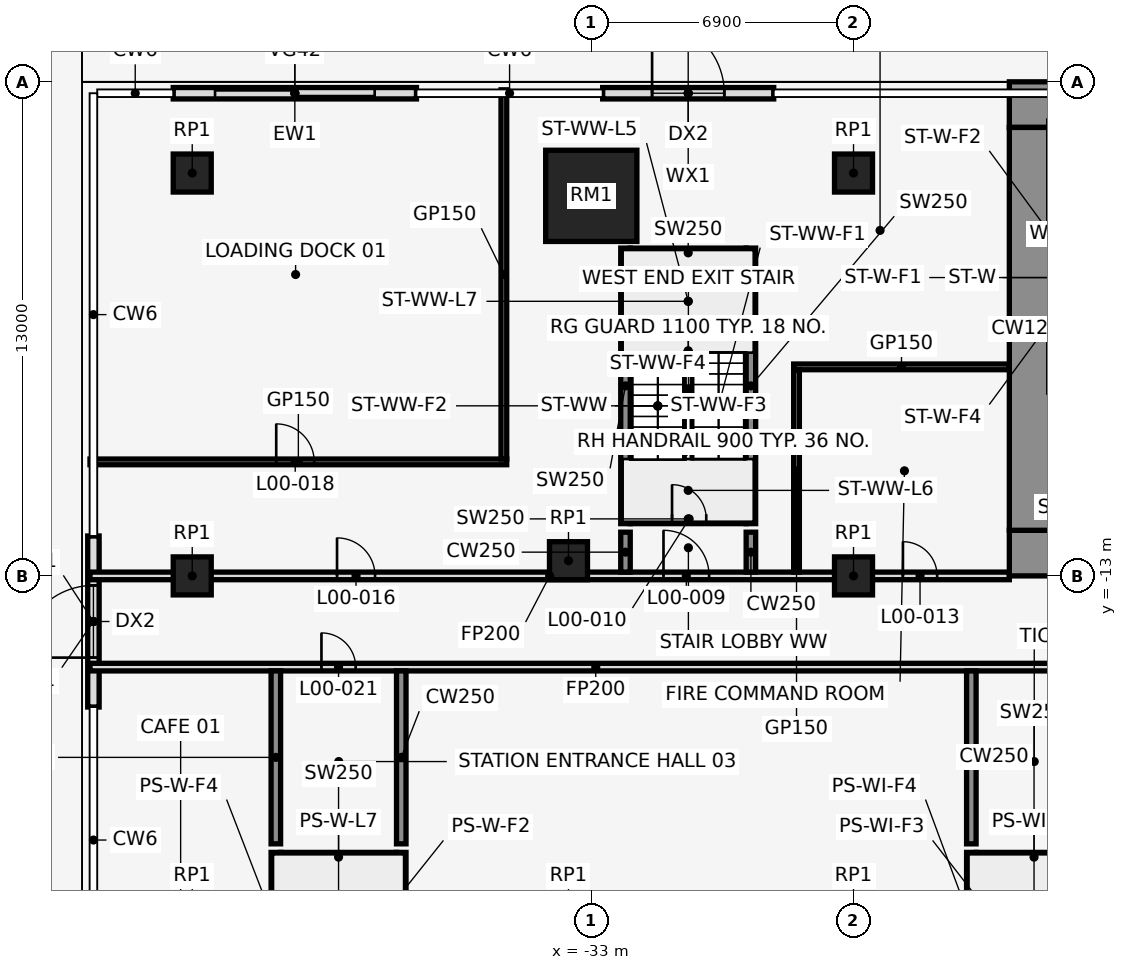
"""IFC4 building model, lengths in metres.
Left out: names, types, materials, properties, quantities, classifications, styles, units other than length and angle.
Written with IfcOpenShell. Run it as: python <this file> out.ifc"""

import sys

from ifc_helpers import new_model, si_unit, direction, frame, frame_2d, origin, origin_2d, place, context, subcontext, project, spatial, rectangle, extrude, element, fill, save


model = new_model("IFC4")
c1 = context("Model", 3, precision=1e-05, world=origin(), true_north=direction((0.0, 1.0)))
c2 = subcontext(c1, "Body", "Model", "MODEL_VIEW")
j1 = project(units=[si_unit("LENGTHUNIT", "METRE"), si_unit("PLANEANGLEUNIT", "RADIAN")], contexts=[c1])
p1 = place(None, origin())
s1 = spatial("IfcSite", under=j1, at=p1, CompositionType="ELEMENT")
p2 = place(p1, origin())
s2 = spatial("IfcBuilding", under=s1, at=p2, CompositionType="ELEMENT")
p3 = place(p2, origin())
s3 = spatial("IfcBuildingStorey", under=s2, at=p3, CompositionType="ELEMENT", Elevation=0.0)
p4 = place(p3, frame((-33.0, -3.0, 0.0), z_axis=(0.0, 0.0, 1.0), x_axis=(1.0, 0.0, 0.0)))
e1 = element("IfcColumn", 1, at=p4, inside=s3, PredefinedType="COLUMN", context=c2, shape_type="SweptSolid", body=[
    extrude(rectangle(XDim=2.4, YDim=2.4, at=origin_2d()), origin(), (0.0, 0.0, 1.0), 8.0),
])
for number, where, z_axis, x_axis in (
    (2, (-26.1, -2.4, 0.0), (0.0, 0.0, 1.0), (1.0, 0.0, 0.0)),
    (3, (-33.6, -12.6, 0.0), (0.0, 0.0, 1.0), (1.0, 0.0, 0.0)),
    (4, (-43.5, -2.4, 0.0), (0.0, 0.0, 1.0), (1.0, 0.0, 0.0)),
    (5, (-43.5, -13.0, 0.0), (0.0, 0.0, 1.0), (1.0, 0.0, 0.0)),
    (6, (-26.1, -13.0, 0.0), (0.0, 0.0, 1.0), (1.0, 0.0, 0.0)),
):
    element("IfcColumn", number, at=place(p3, frame(where, z_axis=z_axis, x_axis=x_axis)), inside=s3, PredefinedType="COLUMN", context=c2, shape_type="SweptSolid", body=[
        extrude(rectangle(XDim=1.0, YDim=1.0, at=origin_2d()), origin(), (0.0, 0.0, 1.0), 8.0),
    ])
p5 = place(p3, frame((-32.7, -0.3, 0.0), z_axis=(0.0, 0.0, 1.0), x_axis=(1.0, 0.0, 0.0)))
e7 = element("IfcWall", 7, at=p5, inside=s3, PredefinedType="STANDARD", context=c2, shape_type="SweptSolid", body=[
    extrude(rectangle(XDim=4.5, YDim=0.3, at=frame_2d((2.25, 0.0))), origin(), (0.0, 0.0, 1.0), 7.7),
])
p6 = place(p5, frame((1.3, 0.0, 0.0)))
e8 = element("IfcOpeningElement", 8, at=p6, cuts=e7, PredefinedType="OPENING", context=c2, shape_type="SweptSolid", body=[
    extrude(rectangle(XDim=1.9, YDim=2.6, at=frame_2d((0.95, 1.3))), frame((0.0, 0.162, 0.0), z_axis=(0.0, -1.0, 0.0), x_axis=(1.0, 0.0, 0.0)), (0.0, 0.0, 1.0), 0.324),
])
p7 = place(p5, frame((1.3, 0.0, 3.3)))
e9 = element("IfcOpeningElement", 9, at=p7, cuts=e7, PredefinedType="OPENING", context=c2, shape_type="SweptSolid", body=[
    extrude(rectangle(XDim=1.9, YDim=3.0, at=frame_2d((0.95, 1.5))), frame((0.0, 0.162, 0.0), z_axis=(0.0, -1.0, 0.0), x_axis=(1.0, 0.0, 0.0)), (0.0, 0.0, 1.0), 0.324),
])
p8 = place(p3, frame((-44.0, -0.3, 0.0), z_axis=(0.0, 0.0, 1.0), x_axis=(1.0, 0.0, 0.0)))
e10 = element("IfcWall", 10, at=p8, inside=s3, PredefinedType="STANDARD", context=c2, shape_type="SweptSolid", body=[
    extrude(rectangle(XDim=6.4, YDim=0.3, at=frame_2d((3.2, 0.0))), origin(), (0.0, 0.0, 1.0), 7.7),
])
p9 = place(p8, frame((1.1, 0.0, 0.0)))
e11 = element("IfcOpeningElement", 11, at=p9, cuts=e10, PredefinedType="OPENING", context=c2, shape_type="SweptSolid", body=[
    extrude(rectangle(XDim=4.2, YDim=4.5, at=frame_2d((2.1, 2.25))), frame((0.0, 0.162, 0.0), z_axis=(0.0, -1.0, 0.0), x_axis=(1.0, 0.0, 0.0)), (0.0, 0.0, 1.0), 0.324),
])
p10 = place(p3, frame((-46.1, -16.45, 0.0), z_axis=(0.0, 0.0, 1.0), x_axis=(0.0, 1.0, 0.0)))
e12 = element("IfcWall", 12, at=p10, inside=s3, PredefinedType="STANDARD", context=c2, shape_type="SweptSolid", body=[
    extrude(rectangle(XDim=4.5, YDim=0.3, at=frame_2d((2.25, 0.0))), origin(), (0.0, 0.0, 1.0), 7.7),
])
p11 = place(p10, frame((1.3, 0.0, 0.0)))
e13 = element("IfcOpeningElement", 13, at=p11, cuts=e12, PredefinedType="OPENING", context=c2, shape_type="SweptSolid", body=[
    extrude(rectangle(XDim=1.9, YDim=2.6, at=frame_2d((0.95, 1.3))), frame((0.0, 0.162, 0.0), z_axis=(0.0, -1.0, 0.0), x_axis=(1.0, 0.0, 0.0)), (0.0, 0.0, 1.0), 0.324),
])
p12 = place(p10, frame((1.3, 0.0, 3.3)))
e14 = element("IfcOpeningElement", 14, at=p12, cuts=e12, PredefinedType="OPENING", context=c2, shape_type="SweptSolid", body=[
    extrude(rectangle(XDim=1.9, YDim=3.0, at=frame_2d((0.95, 1.5))), frame((0.0, 0.162, 0.0), z_axis=(0.0, -1.0, 0.0), x_axis=(1.0, 0.0, 0.0)), (0.0, 0.0, 1.0), 0.324),
])
for number, where, z_axis, x_axis in (
    (15, (-32.1, -11.625, 0.0), (0.0, 0.0, 1.0), (0.0, 1.0, 0.0)),
    (16, (-28.8, -11.625, 0.0), (0.0, 0.0, 1.0), (0.0, 1.0, 0.0)),
):
    element("IfcWall", number, at=place(p3, frame(where, z_axis=z_axis, x_axis=x_axis)), inside=s3, PredefinedType="SHEAR", context=c2, shape_type="SweptSolid", body=[
        extrude(rectangle(XDim=7.25, YDim=0.25, at=frame_2d((3.625, 0.0))), origin(), (0.0, 0.0, 1.0), 8.0),
    ])
p13 = place(p3, frame((-31.975, -11.5, 0.0), z_axis=(0.0, 0.0, 1.0), x_axis=(1.0, 0.0, 0.0)))
e17 = element("IfcWall", 17, at=p13, inside=s3, PredefinedType="SHEAR", context=c2, shape_type="SweptSolid", body=[
    extrude(rectangle(XDim=3.05, YDim=0.25, at=frame_2d((1.525, 0.0))), origin(), (0.0, 0.0, 1.0), 8.0),
])
p14 = place(p13, frame((1.1, 0.0, 0.0)))
e18 = element("IfcOpeningElement", 18, at=p14, cuts=e17, PredefinedType="OPENING", context=c2, shape_type="SweptSolid", body=[
    extrude(rectangle(XDim=0.9, YDim=2.1, at=frame_2d((0.45, 1.05))), frame((0.0, 0.137, 0.0), z_axis=(0.0, -1.0, 0.0), x_axis=(1.0, 0.0, 0.0)), (0.0, 0.0, 1.0), 0.274),
])
p15 = place(p3, frame((-31.975, -4.5, 0.0), z_axis=(0.0, 0.0, 1.0), x_axis=(1.0, 0.0, 0.0)))
e19 = element("IfcWall", 19, at=p15, inside=s3, PredefinedType="SHEAR", context=c2, shape_type="SweptSolid", body=[
    extrude(rectangle(XDim=3.05, YDim=0.25, at=frame_2d((1.525, 0.0))), origin(), (0.0, 0.0, 1.0), 8.0),
])
for number, where, z_axis, x_axis in (
    (20, (-41.3, -27.525, 0.0), (0.0, 0.0, 1.0), (0.0, 1.0, 0.0)),
    (21, (-38.0, -27.525, 0.0), (0.0, 0.0, 1.0), (0.0, 1.0, 0.0)),
):
    element("IfcWall", number, at=place(p3, frame(where, z_axis=z_axis, x_axis=x_axis)), inside=s3, PredefinedType="SHEAR", context=c2, shape_type="SweptSolid", body=[
        extrude(rectangle(XDim=7.25, YDim=0.25, at=frame_2d((3.625, 0.0))), origin(), (0.0, 0.0, 1.0), 8.0),
    ])
p16 = place(p3, frame((-41.175, -20.4, 0.0), z_axis=(0.0, 0.0, 1.0), x_axis=(1.0, 0.0, 0.0)))
e22 = element("IfcWall", 22, at=p16, inside=s3, PredefinedType="SHEAR", context=c2, shape_type="SweptSolid", body=[
    extrude(rectangle(XDim=3.05, YDim=0.25, at=frame_2d((1.525, 0.0))), origin(), (0.0, 0.0, 1.0), 8.0),
])
p17 = place(p3, frame((-23.0, -27.525, 0.0), z_axis=(0.0, 0.0, 1.0), x_axis=(0.0, 1.0, 0.0)))
e23 = element("IfcWall", 23, at=p17, inside=s3, PredefinedType="SHEAR", context=c2, shape_type="SweptSolid", body=[
    extrude(rectangle(XDim=7.25, YDim=0.25, at=frame_2d((3.625, 0.0))), origin(), (0.0, 0.0, 1.0), 8.0),
])
p18 = place(p3, frame((-22.875, -20.4, 0.0), z_axis=(0.0, 0.0, 1.0), x_axis=(1.0, 0.0, 0.0)))
e24 = element("IfcWall", 24, at=p18, inside=s3, PredefinedType="SHEAR", context=c2, shape_type="SweptSolid", body=[
    extrude(rectangle(XDim=3.05, YDim=0.25, at=frame_2d((1.525, 0.0))), origin(), (0.0, 0.0, 1.0), 8.0),
])
p19 = place(p3, frame((-46.19, -15.4, 0.0), z_axis=(0.0, 0.0, 1.0), x_axis=(1.0, 0.0, 0.0)))
e25 = element("IfcWall", 25, at=p19, inside=s3, PredefinedType="PARTITIONING", context=c2, shape_type="SweptSolid", body=[
    extrude(rectangle(XDim=26.615, YDim=0.2, at=frame_2d((13.308, 0.0))), origin(), (0.0, 0.0, 1.0), 7.7),
])
p20 = place(p19, frame((6.09, 0.0, 0.0)))
e26 = element("IfcOpeningElement", 26, at=p20, cuts=e25, PredefinedType="OPENING", context=c2, shape_type="SweptSolid", body=[
    extrude(rectangle(XDim=0.9, YDim=2.1, at=frame_2d((0.45, 1.05))), frame((0.0, 0.112, 0.0), z_axis=(0.0, -1.0, 0.0), x_axis=(1.0, 0.0, 0.0)), (0.0, 0.0, 1.0), 0.224),
])
p21 = place(p3, frame((-46.19, -13.0, 0.0), z_axis=(0.0, 0.0, 1.0), x_axis=(1.0, 0.0, 0.0)))
e27 = element("IfcWall", 27, at=p21, inside=s3, PredefinedType="PARTITIONING", context=c2, shape_type="SweptSolid", body=[
    extrude(rectangle(XDim=24.19, YDim=0.2, at=frame_2d((12.095, 0.0))), origin(), (0.0, 0.0, 1.0), 7.7),
])
p22 = place(p21, frame((15.09, 0.0, 0.0)))
e28 = element("IfcOpeningElement", 28, at=p22, cuts=e27, PredefinedType="OPENING", context=c2, shape_type="SweptSolid", body=[
    extrude(rectangle(XDim=1.2, YDim=2.1, at=frame_2d((0.6, 1.05))), frame((0.0, 0.112, 0.0), z_axis=(0.0, -1.0, 0.0), x_axis=(1.0, 0.0, 0.0)), (0.0, 0.0, 1.0), 0.224),
])
p23 = place(p21, frame((21.39, 0.0, 0.0)))
e29 = element("IfcOpeningElement", 29, at=p23, cuts=e27, PredefinedType="OPENING", context=c2, shape_type="SweptSolid", body=[
    extrude(rectangle(XDim=0.9, YDim=2.1, at=frame_2d((0.45, 1.05))), frame((0.0, 0.112, 0.0), z_axis=(0.0, -1.0, 0.0), x_axis=(1.0, 0.0, 0.0)), (0.0, 0.0, 1.0), 0.224),
])
p24 = place(p21, frame((6.5, 0.0, 0.0)))
e30 = element("IfcOpeningElement", 30, at=p24, cuts=e27, PredefinedType="OPENING", context=c2, shape_type="SweptSolid", body=[
    extrude(rectangle(XDim=1.0, YDim=2.1, at=frame_2d((0.5, 1.05))), frame((0.0, 0.112, 0.0), z_axis=(0.0, -1.0, 0.0), x_axis=(1.0, 0.0, 0.0)), (0.0, 0.0, 1.0), 0.224),
])
p25 = place(p3, frame((-46.19, -10.0, 0.0), z_axis=(0.0, 0.0, 1.0), x_axis=(1.0, 0.0, 0.0)))
e31 = element("IfcWall", 31, at=p25, inside=s3, PredefinedType="PARTITIONING", context=c2, shape_type="SweptSolid", body=[
    extrude(rectangle(XDim=10.965, YDim=0.15, at=frame_2d((5.482, 0.0))), origin(), (0.0, 0.0, 1.0), 7.7),
])
p26 = place(p25, frame((4.9, 0.0, 0.0)))
e32 = element("IfcOpeningElement", 32, at=p26, cuts=e31, PredefinedType="OPENING", context=c2, shape_type="SweptSolid", body=[
    extrude(rectangle(XDim=1.0, YDim=2.1, at=frame_2d((0.5, 1.05))), frame((0.0, 0.087, 0.0), z_axis=(0.0, -1.0, 0.0), x_axis=(1.0, 0.0, 0.0)), (0.0, 0.0, 1.0), 0.174),
])
p27 = place(p3, frame((-27.675, -7.5, 0.0), z_axis=(0.0, 0.0, 1.0), x_axis=(1.0, 0.0, 0.0)))
e33 = element("IfcWall", 33, at=p27, inside=s3, PredefinedType="PARTITIONING", context=c2, shape_type="SweptSolid", body=[
    extrude(rectangle(XDim=5.675, YDim=0.15, at=frame_2d((2.837, 0.0))), origin(), (0.0, 0.0, 1.0), 7.7),
])
for number, where, z_axis, x_axis in (
    (34, (-41.3, -20.05, 0.0), (0.0, 0.0, 1.0), (0.0, 1.0, 0.0)),
    (35, (-38.0, -20.05, 0.0), (0.0, 0.0, 1.0), (0.0, 1.0, 0.0)),
):
    element("IfcWall", number, at=place(p3, frame(where, z_axis=z_axis, x_axis=x_axis)), inside=s3, PredefinedType="SHEAR", context=c2, shape_type="SweptSolid", body=[
        extrude(rectangle(XDim=4.55, YDim=0.25, at=frame_2d((2.275, 0.0))), origin(), (0.0, 0.0, 1.0), 8.0),
    ])
p28 = place(p3, frame((-35.3, -9.925, 0.0), z_axis=(0.0, 0.0, 1.0), x_axis=(0.0, 1.0, 0.0)))
e36 = element("IfcWall", 36, at=p28, inside=s3, PredefinedType="PARTITIONING", context=c2, shape_type="SweptSolid", body=[
    extrude(rectangle(XDim=9.715, YDim=0.15, at=frame_2d((4.857, 0.0))), origin(), (0.0, 0.0, 1.0), 7.7),
])
for number, where, z_axis, x_axis in (
    (37, (-32.1, -12.9, 0.0), (0.0, 0.0, 1.0), (0.0, 1.0, 0.0)),
    (38, (-28.8, -12.9, 0.0), (0.0, 0.0, 1.0), (0.0, 1.0, 0.0)),
):
    element("IfcWall", number, at=place(p3, frame(where, z_axis=z_axis, x_axis=x_axis)), inside=s3, PredefinedType="SHEAR", context=c2, shape_type="SweptSolid", body=[
        extrude(rectangle(XDim=1.05, YDim=0.25, at=frame_2d((0.525, 0.0))), origin(), (0.0, 0.0, 1.0), 8.0),
    ])
p29 = place(p3, frame((-27.6, -12.9, 0.0), z_axis=(0.0, 0.0, 1.0), x_axis=(0.0, 1.0, 0.0)))
e39 = element("IfcWall", 39, at=p29, inside=s3, PredefinedType="PARTITIONING", context=c2, shape_type="SweptSolid", body=[
    extrude(rectangle(XDim=5.325, YDim=0.15, at=frame_2d((2.663, 0.0))), origin(), (0.0, 0.0, 1.0), 7.7),
])
p30 = place(p3, frame((-23.0, -20.05, 0.0), z_axis=(0.0, 0.0, 1.0), x_axis=(0.0, 1.0, 0.0)))
e40 = element("IfcWall", 40, at=p30, inside=s3, PredefinedType="SHEAR", context=c2, shape_type="SweptSolid", body=[
    extrude(rectangle(XDim=4.55, YDim=0.25, at=frame_2d((2.275, 0.0))), origin(), (0.0, 0.0, 1.0), 8.0),
])
p31 = place(p3, frame((-22.0, -0.6, 0.0), z_axis=(0.0, 0.0, 1.0), x_axis=(1.0, 0.0, 0.0)))
e41 = element("IfcWall", 41, at=p31, inside=s3, PredefinedType="SHEAR", context=c2, shape_type="SweptSolid", body=[
    extrude(rectangle(XDim=44.0, YDim=1.2, at=frame_2d((22.0, 0.0))), origin(), (0.0, 0.0, 1.0), 8.0),
])
p32 = place(p3, frame((-22.0, -12.4, 0.0), z_axis=(0.0, 0.0, 1.0), x_axis=(1.0, 0.0, 0.0)))
e42 = element("IfcWall", 42, at=p32, inside=s3, PredefinedType="SHEAR", context=c2, shape_type="SweptSolid", body=[
    extrude(rectangle(XDim=44.0, YDim=1.2, at=frame_2d((22.0, 0.0))), origin(), (0.0, 0.0, 1.0), 8.0),
])
p33 = place(p32, frame((2.2, 0.0, 0.0)))
e43 = element("IfcOpeningElement", 43, at=p33, cuts=e42, PredefinedType="OPENING", context=c2, shape_type="SweptSolid", body=[
    extrude(rectangle(XDim=1.2, YDim=2.1, at=frame_2d((0.6, 1.05))), frame((0.0, 0.612, 0.0), z_axis=(0.0, -1.0, 0.0), x_axis=(1.0, 0.0, 0.0)), (0.0, 0.0, 1.0), 1.224),
])
p34 = place(p32, frame((21.4, 0.0, 0.0)))
e44 = element("IfcOpeningElement", 44, at=p34, cuts=e42, PredefinedType="OPENING", context=c2, shape_type="SweptSolid", body=[
    extrude(rectangle(XDim=1.2, YDim=2.1, at=frame_2d((0.6, 1.05))), frame((0.0, 0.612, 0.0), z_axis=(0.0, -1.0, 0.0), x_axis=(1.0, 0.0, 0.0)), (0.0, 0.0, 1.0), 1.224),
])
p35 = place(p32, frame((40.6, 0.0, 0.0)))
e45 = element("IfcOpeningElement", 45, at=p35, cuts=e42, PredefinedType="OPENING", context=c2, shape_type="SweptSolid", body=[
    extrude(rectangle(XDim=1.2, YDim=2.1, at=frame_2d((0.6, 1.05))), frame((0.0, 0.612, 0.0), z_axis=(0.0, -1.0, 0.0), x_axis=(1.0, 0.0, 0.0)), (0.0, 0.0, 1.0), 1.224),
])
p36 = place(p32, frame((16.0, 0.0, 0.0)))
e46 = element("IfcOpeningElement", 46, at=p36, cuts=e42, PredefinedType="OPENING", context=c2, shape_type="SweptSolid", body=[
    extrude(rectangle(XDim=1.8, YDim=2.1, at=frame_2d((0.9, 1.05))), frame((0.0, 0.612, 0.0), z_axis=(0.0, -1.0, 0.0), x_axis=(1.0, 0.0, 0.0)), (0.0, 0.0, 1.0), 1.224),
])
p37 = place(p32, frame((6.3, 0.0, 0.0)))
e47 = element("IfcOpeningElement", 47, at=p37, cuts=e42, PredefinedType="OPENING", context=c2, shape_type="SweptSolid", body=[
    extrude(rectangle(XDim=1.2, YDim=2.1, at=frame_2d((0.6, 1.05))), frame((0.0, 0.612, 0.0), z_axis=(0.0, -1.0, 0.0), x_axis=(1.0, 0.0, 0.0)), (0.0, 0.0, 1.0), 1.224),
])
p38 = place(p32, frame((26.2, 0.0, 0.0)))
e48 = element("IfcOpeningElement", 48, at=p38, cuts=e42, PredefinedType="OPENING", context=c2, shape_type="SweptSolid", body=[
    extrude(rectangle(XDim=1.8, YDim=2.1, at=frame_2d((0.9, 1.05))), frame((0.0, 0.612, 0.0), z_axis=(0.0, -1.0, 0.0), x_axis=(1.0, 0.0, 0.0)), (0.0, 0.0, 1.0), 1.224),
])
p39 = place(p32, frame((36.5, 0.0, 0.0)))
e49 = element("IfcOpeningElement", 49, at=p39, cuts=e42, PredefinedType="OPENING", context=c2, shape_type="SweptSolid", body=[
    extrude(rectangle(XDim=1.2, YDim=2.1, at=frame_2d((0.6, 1.05))), frame((0.0, 0.612, 0.0), z_axis=(0.0, -1.0, 0.0), x_axis=(1.0, 0.0, 0.0)), (0.0, 0.0, 1.0), 1.224),
])
p40 = place(p3, frame((-21.4, -11.8, 0.0), z_axis=(0.0, 0.0, 1.0), x_axis=(0.0, 1.0, 0.0)))
e50 = element("IfcWall", 50, at=p40, inside=s3, PredefinedType="SHEAR", context=c2, shape_type="SweptSolid", body=[
    extrude(rectangle(XDim=10.6, YDim=1.2, at=frame_2d((5.3, 0.0))), origin(), (0.0, 0.0, 1.0), 8.0),
])
p41 = place(p6, origin())
e51 = element("IfcDoor", 51, at=p41, inside=s3, OperationType="SINGLE_SWING_LEFT", PredefinedType="DOOR", context=c2, shape_type="SweptSolid", body=[
    extrude(rectangle(XDim=1.9, YDim=2.6, at=frame_2d((0.95, 1.3))), frame((0.0, 0.025, 0.0), z_axis=(0.0, -1.0, 0.0), x_axis=(1.0, 0.0, 0.0)), (0.0, 0.0, 1.0), 0.05),
])
fill(e8, e51)
p42 = place(p7, origin())
e52 = element("IfcWindow", 52, at=p42, inside=s3, PartitioningType="SINGLE_PANEL", PredefinedType="WINDOW", context=c2, shape_type="SweptSolid", body=[
    extrude(rectangle(XDim=1.9, YDim=3.0, at=frame_2d((0.95, 1.5))), frame((0.0, 0.03, 0.0), z_axis=(0.0, -1.0, 0.0), x_axis=(1.0, 0.0, 0.0)), (0.0, 0.0, 1.0), 0.06),
])
fill(e9, e52)
p43 = place(p9, origin())
e53 = element("IfcDoor", 53, at=p43, inside=s3, OperationType="SINGLE_SWING_LEFT", PredefinedType="GATE", context=c2, shape_type="SweptSolid", body=[
    extrude(rectangle(XDim=4.2, YDim=4.5, at=frame_2d((2.1, 2.25))), frame((0.0, 0.025, 0.0), z_axis=(0.0, -1.0, 0.0), x_axis=(1.0, 0.0, 0.0)), (0.0, 0.0, 1.0), 0.05),
])
fill(e11, e53)
p44 = place(p11, origin())
e54 = element("IfcDoor", 54, at=p44, inside=s3, OperationType="SINGLE_SWING_LEFT", PredefinedType="DOOR", context=c2, shape_type="SweptSolid", body=[
    extrude(rectangle(XDim=1.9, YDim=2.6, at=frame_2d((0.95, 1.3))), frame((0.0, 0.025, 0.0), z_axis=(0.0, -1.0, 0.0), x_axis=(1.0, 0.0, 0.0)), (0.0, 0.0, 1.0), 0.05),
])
fill(e13, e54)
p45 = place(p12, origin())
e55 = element("IfcWindow", 55, at=p45, inside=s3, PartitioningType="SINGLE_PANEL", PredefinedType="WINDOW", context=c2, shape_type="SweptSolid", body=[
    extrude(rectangle(XDim=1.9, YDim=3.0, at=frame_2d((0.95, 1.5))), frame((0.0, 0.03, 0.0), z_axis=(0.0, -1.0, 0.0), x_axis=(1.0, 0.0, 0.0)), (0.0, 0.0, 1.0), 0.06),
])
fill(e14, e55)
p46 = place(p22, origin())
e56 = element("IfcDoor", 56, at=p46, inside=s3, OperationType="SINGLE_SWING_RIGHT", PredefinedType="DOOR", context=c2, shape_type="SweptSolid", body=[
    extrude(rectangle(XDim=1.2, YDim=2.1, at=frame_2d((0.6, 1.05))), frame((0.0, 0.025, 0.0), z_axis=(0.0, -1.0, 0.0), x_axis=(1.0, 0.0, 0.0)), (0.0, 0.0, 1.0), 0.05),
])
fill(e28, e56)
p47 = place(p14, origin())
e57 = element("IfcDoor", 57, at=p47, inside=s3, OperationType="SINGLE_SWING_LEFT", PredefinedType="DOOR", context=c2, shape_type="SweptSolid", body=[
    extrude(rectangle(XDim=0.9, YDim=2.1, at=frame_2d((0.45, 1.05))), frame((0.0, 0.025, 0.0), z_axis=(0.0, -1.0, 0.0), x_axis=(1.0, 0.0, 0.0)), (0.0, 0.0, 1.0), 0.05),
])
fill(e18, e57)
p48 = place(p23, origin())
e58 = element("IfcDoor", 58, at=p48, inside=s3, OperationType="SINGLE_SWING_LEFT", PredefinedType="DOOR", context=c2, shape_type="SweptSolid", body=[
    extrude(rectangle(XDim=0.9, YDim=2.1, at=frame_2d((0.45, 1.05))), frame((0.0, 0.025, 0.0), z_axis=(0.0, -1.0, 0.0), x_axis=(1.0, 0.0, 0.0)), (0.0, 0.0, 1.0), 0.05),
])
fill(e29, e58)
p49 = place(p24, origin())
e59 = element("IfcDoor", 59, at=p49, inside=s3, OperationType="SINGLE_SWING_LEFT", PredefinedType="DOOR", context=c2, shape_type="SweptSolid", body=[
    extrude(rectangle(XDim=1.0, YDim=2.1, at=frame_2d((0.5, 1.05))), frame((0.0, 0.025, 0.0), z_axis=(0.0, -1.0, 0.0), x_axis=(1.0, 0.0, 0.0)), (0.0, 0.0, 1.0), 0.05),
])
fill(e30, e59)
p50 = place(p26, origin())
e60 = element("IfcDoor", 60, at=p50, inside=s3, OperationType="SINGLE_SWING_RIGHT", PredefinedType="DOOR", context=c2, shape_type="SweptSolid", body=[
    extrude(rectangle(XDim=1.0, YDim=2.1, at=frame_2d((0.5, 1.05))), frame((0.0, 0.025, 0.0), z_axis=(0.0, -1.0, 0.0), x_axis=(1.0, 0.0, 0.0)), (0.0, 0.0, 1.0), 0.05),
])
fill(e32, e60)
p51 = place(p20, frame((0.9, 0.0, 0.0), z_axis=(0.0, 0.0, 1.0), x_axis=(-1.0, 0.0, 0.0)))
e61 = element("IfcDoor", 61, at=p51, inside=s3, OperationType="SINGLE_SWING_RIGHT", PredefinedType="DOOR", context=c2, shape_type="SweptSolid", body=[
    extrude(rectangle(XDim=0.9, YDim=2.1, at=frame_2d((0.45, 1.05))), frame((0.0, 0.025, 0.0), z_axis=(0.0, -1.0, 0.0), x_axis=(1.0, 0.0, 0.0)), (0.0, 0.0, 1.0), 0.05),
])
fill(e26, e61)
save(model, sys.argv[1])
